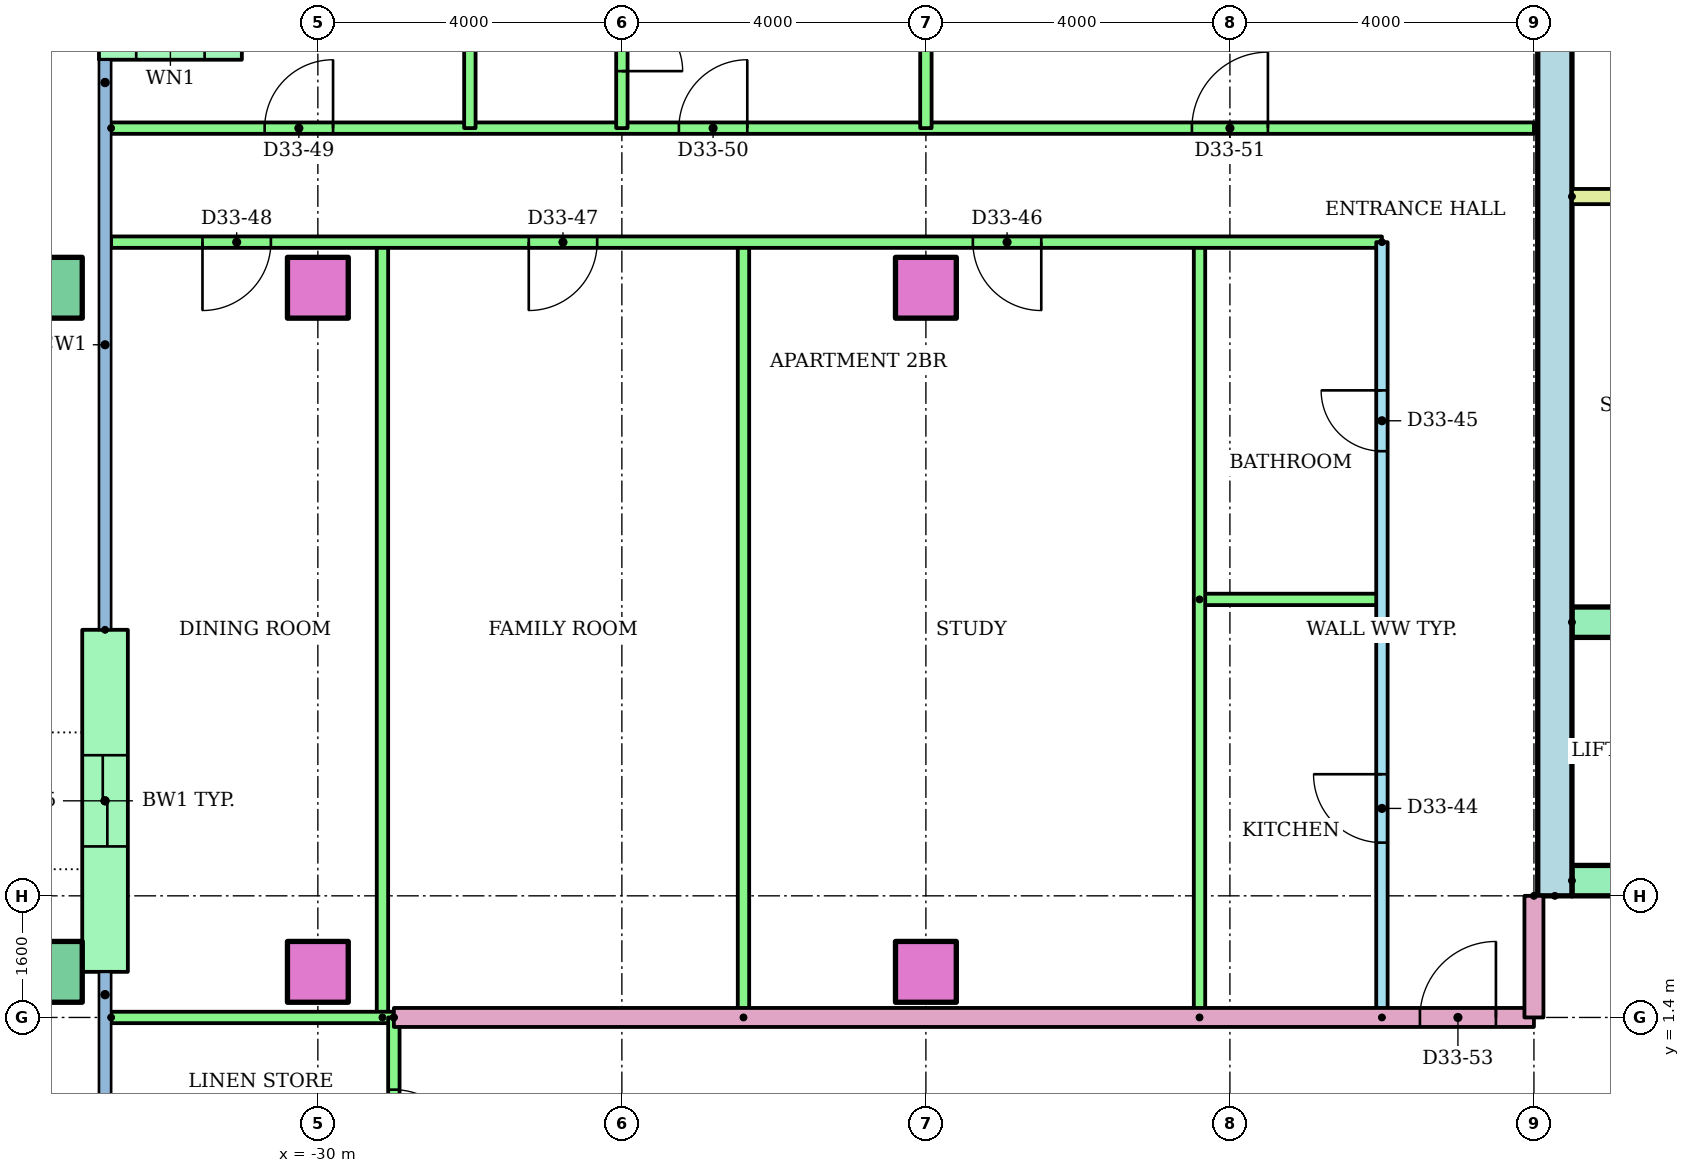
"""IFC4 building model, lengths in metres.
Left out: names, types, materials, properties, quantities, classifications, styles, units other than length and angle.
Written with IfcOpenShell. Run it as: python <this file> out.ifc"""

import sys

from ifc_helpers import new_model, si_unit, direction, frame, frame_2d, origin, origin_2d, place, context, subcontext, project, spatial, rectangle, hollow_rectangle, extrude, element, fill, save


model = new_model("IFC4")
c1 = context("Model", 3, precision=1e-05, world=origin(), true_north=direction((0.0, 1.0)))
c2 = subcontext(c1, "Body", "Model", "MODEL_VIEW")
j1 = project(units=[si_unit("LENGTHUNIT", "METRE"), si_unit("PLANEANGLEUNIT", "RADIAN")], contexts=[c1])
p1 = place(None, origin())
s1 = spatial("IfcSite", under=j1, at=p1, CompositionType="ELEMENT")
p2 = place(p1, origin())
s2 = spatial("IfcBuilding", under=s1, at=p2, CompositionType="ELEMENT")
p3 = place(p2, frame((0.0, 0.0, 129.4)))
s3 = spatial("IfcBuildingStorey", under=s2, at=p3, CompositionType="ELEMENT", Elevation=129.4)
p4 = place(p3, frame((-33.5, 2.0, 0.0)))
e1 = element("IfcColumn", 1, at=p4, inside=s3, PredefinedType="COLUMN", context=c2, shape_type="SweptSolid", body=[
    extrude(hollow_rectangle(XDim=0.8, YDim=0.8, WallThickness=0.04, at=origin_2d()), origin(), (0.0, 0.0, 1.0), 3.2),
])
for number, where in (
    (2, (-30.0, 2.0, 0.0)),
    (3, (-22.0, 2.0, 0.0)),
):
    element("IfcColumn", number, at=place(p3, frame(where)), inside=s3, PredefinedType="COLUMN", context=c2, shape_type="SweptSolid", body=[
        extrude(rectangle(XDim=0.8, YDim=0.8, at=origin_2d()), origin(), (0.0, 0.0, 1.0), 3.2),
    ])
p5 = place(p3, frame((-33.5, 11.0, 0.0)))
e4 = element("IfcColumn", 4, at=p5, inside=s3, PredefinedType="COLUMN", context=c2, shape_type="SweptSolid", body=[
    extrude(hollow_rectangle(XDim=0.8, YDim=0.8, WallThickness=0.04, at=origin_2d()), origin(), (0.0, 0.0, 1.0), 3.2),
])
for number, where in (
    (5, (-30.0, 11.0, 0.0)),
    (6, (-22.0, 11.0, 0.0)),
):
    element("IfcColumn", number, at=place(p3, frame(where)), inside=s3, PredefinedType="COLUMN", context=c2, shape_type="SweptSolid", body=[
        extrude(rectangle(XDim=0.8, YDim=0.8, at=origin_2d()), origin(), (0.0, 0.0, 1.0), 3.2),
    ])
p6 = place(p3, frame((-31.0, 14.3, 0.0), z_axis=(0.0, 0.0, 1.0), x_axis=(-1.0, 0.0, 0.0)))
e7 = element("IfcWall", 7, at=p6, inside=s3, PredefinedType="STANDARD", context=c2, shape_type="SweptSolid", body=[
    extrude(rectangle(XDim=1.88, YDim=0.6, at=frame_2d((0.94, 0.0))), origin(), (0.0, 0.0, 1.0), 2.92),
])
p7 = place(p6, frame((0.49, 0.0, 0.9)))
e8 = element("IfcOpeningElement", 8, at=p7, cuts=e7, PredefinedType="OPENING", context=c2, shape_type="SweptSolid", body=[
    extrude(rectangle(XDim=0.9, YDim=1.5, at=frame_2d((0.45, 0.75))), frame((0.0, 0.31, 0.0), z_axis=(0.0, -1.0, 0.0), x_axis=(1.0, 0.0, 0.0)), (0.0, 0.0, 1.0), 0.62),
])
p8 = place(p3, frame((-32.8, 6.5, 0.0), z_axis=(0.0, 0.0, 1.0), x_axis=(0.0, -1.0, 0.0)))
e9 = element("IfcWall", 9, at=p8, inside=s3, PredefinedType="STANDARD", context=c2, shape_type="SweptSolid", body=[
    extrude(rectangle(XDim=4.5, YDim=0.6, at=frame_2d((2.25, 0.0))), origin(), (0.0, 0.0, 1.0), 2.92),
])
p9 = place(p8, frame((1.65, 0.0, 0.0)))
e10 = element("IfcOpeningElement", 10, at=p9, cuts=e9, PredefinedType="OPENING", context=c2, shape_type="SweptSolid", body=[
    extrude(rectangle(XDim=1.2, YDim=2.1, at=frame_2d((0.6, 1.05))), frame((0.0, 0.31, 0.0), z_axis=(0.0, -1.0, 0.0), x_axis=(1.0, 0.0, 0.0)), (0.0, 0.0, 1.0), 0.62),
])
p10 = place(p3, frame((-13.725, 3.0, 0.0), z_axis=(0.0, 0.0, 1.0), x_axis=(0.0, 1.0, 0.0)))
e11 = element("IfcWall", 11, at=p10, inside=s3, PredefinedType="SHEAR", context=c2, shape_type="SweptSolid", body=[
    extrude(rectangle(XDim=17.0, YDim=0.45, at=frame_2d((8.5, 0.0))), origin(), (0.0, 0.0, 1.0), 2.92),
])
p11 = place(p3, frame((-13.5, 3.2, 0.0)))
e12 = element("IfcWall", 12, at=p11, inside=s3, PredefinedType="SHEAR", context=c2, shape_type="SweptSolid", body=[
    extrude(rectangle(XDim=27.0, YDim=0.4, at=frame_2d((13.5, 0.0))), origin(), (0.0, 0.0, 1.0), 2.92),
])
p12 = place(p11, frame((6.861, 0.0, 0.0)))
e13 = element("IfcOpeningElement", 13, at=p12, cuts=e12, PredefinedType="OPENING", context=c2, shape_type="SweptSolid", body=[
    extrude(rectangle(XDim=1.1, YDim=2.1, at=frame_2d((0.55, 1.05))), frame((0.0, 0.21, 0.0), z_axis=(0.0, -1.0, 0.0), x_axis=(1.0, 0.0, 0.0)), (0.0, 0.0, 1.0), 0.42),
])
p13 = place(p11, frame((9.906, 0.0, 0.0)))
e14 = element("IfcOpeningElement", 14, at=p13, cuts=e12, PredefinedType="OPENING", context=c2, shape_type="SweptSolid", body=[
    extrude(rectangle(XDim=1.1, YDim=2.1, at=frame_2d((0.55, 1.05))), frame((0.0, 0.21, 0.0), z_axis=(0.0, -1.0, 0.0), x_axis=(1.0, 0.0, 0.0)), (0.0, 0.0, 1.0), 0.42),
])
p14 = place(p11, frame((15.994, 0.0, 0.0)))
e15 = element("IfcOpeningElement", 15, at=p14, cuts=e12, PredefinedType="OPENING", context=c2, shape_type="SweptSolid", body=[
    extrude(rectangle(XDim=1.1, YDim=2.1, at=frame_2d((0.55, 1.05))), frame((0.0, 0.21, 0.0), z_axis=(0.0, -1.0, 0.0), x_axis=(1.0, 0.0, 0.0)), (0.0, 0.0, 1.0), 0.42),
])
p15 = place(p11, frame((19.039, 0.0, 0.0)))
e16 = element("IfcOpeningElement", 16, at=p15, cuts=e12, PredefinedType="OPENING", context=c2, shape_type="SweptSolid", body=[
    extrude(rectangle(XDim=1.1, YDim=2.1, at=frame_2d((0.55, 1.05))), frame((0.0, 0.21, 0.0), z_axis=(0.0, -1.0, 0.0), x_axis=(1.0, 0.0, 0.0)), (0.0, 0.0, 1.0), 0.42),
])
p16 = place(p11, frame((12.6, 0.0, 0.0)))
e17 = element("IfcOpeningElement", 17, at=p16, cuts=e12, PredefinedType="OPENING", context=c2, shape_type="SweptSolid", body=[
    extrude(rectangle(XDim=1.8, YDim=2.1, at=frame_2d((0.9, 1.05))), frame((0.0, 0.21, 0.0), z_axis=(0.0, -1.0, 0.0), x_axis=(1.0, 0.0, 0.0)), (0.0, 0.0, 1.0), 0.42),
])
p17 = place(p3, frame((-13.5, 6.6, 0.0)))
e18 = element("IfcWall", 18, at=p17, inside=s3, PredefinedType="SHEAR", context=c2, shape_type="SweptSolid", body=[
    extrude(rectangle(XDim=11.978, YDim=0.4, at=frame_2d((5.989, 0.0))), origin(), (0.0, 0.0, 1.0), 2.92),
])
p18 = place(p3, frame((-13.5, 12.2, 0.0)))
e19 = element("IfcWall", 19, at=p18, inside=s3, PredefinedType="PARTITIONING", context=c2, shape_type="SweptSolid", body=[
    extrude(rectangle(XDim=3.9, YDim=0.2, at=frame_2d((1.95, 0.0))), origin(), (0.0, 0.0, 1.0), 2.92),
])
p19 = place(p3, frame((-16.0, 1.4, 0.0), z_axis=(0.0, 0.0, 1.0), x_axis=(0.0, 1.0, 0.0)))
e20 = element("IfcWall", 20, at=p19, inside=s3, PredefinedType="PARTITIONING", context=c2, shape_type="SweptSolid", body=[
    extrude(rectangle(XDim=10.2, YDim=0.15, at=frame_2d((5.1, 0.0))), origin(), (0.0, 0.0, 1.0), 2.4),
])
p20 = place(p19, frame((2.3, 0.0, 0.0)))
e21 = element("IfcOpeningElement", 21, at=p20, cuts=e20, PredefinedType="OPENING", context=c2, shape_type="SweptSolid", body=[
    extrude(rectangle(XDim=0.9, YDim=2.1, at=frame_2d((0.45, 1.05))), frame((0.0, 0.085, 0.0), z_axis=(0.0, -1.0, 0.0), x_axis=(1.0, 0.0, 0.0)), (0.0, 0.0, 1.0), 0.17),
])
p21 = place(p19, frame((7.45, 0.0, 0.0)))
e22 = element("IfcOpeningElement", 22, at=p21, cuts=e20, PredefinedType="OPENING", context=c2, shape_type="SweptSolid", body=[
    extrude(rectangle(XDim=0.8, YDim=2.1, at=frame_2d((0.4, 1.05))), frame((0.0, 0.085, 0.0), z_axis=(0.0, -1.0, 0.0), x_axis=(1.0, 0.0, 0.0)), (0.0, 0.0, 1.0), 0.17),
])
p22 = place(p3, frame((-18.4, 6.9, 0.0)))
e23 = element("IfcWall", 23, at=p22, inside=s3, PredefinedType="PARTITIONING", context=c2, shape_type="SweptSolid", body=[
    extrude(rectangle(XDim=2.4, YDim=0.15, at=frame_2d((1.2, 0.0))), origin(), (0.0, 0.0, 1.0), 2.4),
])
for number, where, z_axis, x_axis in (
    (24, (-18.4, 1.4, 0.0), (0.0, 0.0, 1.0), (0.0, 1.0, 0.0)),
    (25, (-24.4, 1.4, 0.0), (0.0, 0.0, 1.0), (0.0, 1.0, 0.0)),
    (26, (-29.15, 1.4, 0.0), (0.0, 0.0, 1.0), (0.0, 1.0, 0.0)),
):
    element("IfcWall", number, at=place(p3, frame(where, z_axis=z_axis, x_axis=x_axis)), inside=s3, PredefinedType="PARTITIONING", context=c2, shape_type="SweptSolid", body=[
        extrude(rectangle(XDim=10.2, YDim=0.15, at=frame_2d((5.1, 0.0))), origin(), (0.0, 0.0, 1.0), 2.4),
    ])
p23 = place(p3, frame((-16.0, 11.6, 0.0), z_axis=(0.0, 0.0, 1.0), x_axis=(-1.0, 0.0, 0.0)))
e27 = element("IfcWall", 27, at=p23, inside=s3, PredefinedType="PARTITIONING", context=c2, shape_type="SweptSolid", body=[
    extrude(rectangle(XDim=16.72, YDim=0.15, at=frame_2d((8.36, 0.0))), origin(), (0.0, 0.0, 1.0), 2.4),
])
p24 = place(p23, frame((4.482, 0.0, 0.0)))
e28 = element("IfcOpeningElement", 28, at=p24, cuts=e27, PredefinedType="OPENING", context=c2, shape_type="SweptSolid", body=[
    extrude(rectangle(XDim=0.9, YDim=2.1, at=frame_2d((0.45, 1.05))), frame((0.0, 0.085, 0.0), z_axis=(0.0, -1.0, 0.0), x_axis=(1.0, 0.0, 0.0)), (0.0, 0.0, 1.0), 0.17),
])
p25 = place(p23, frame((10.325, 0.0, 0.0)))
e29 = element("IfcOpeningElement", 29, at=p25, cuts=e27, PredefinedType="OPENING", context=c2, shape_type="SweptSolid", body=[
    extrude(rectangle(XDim=0.9, YDim=2.1, at=frame_2d((0.45, 1.05))), frame((0.0, 0.085, 0.0), z_axis=(0.0, -1.0, 0.0), x_axis=(1.0, 0.0, 0.0)), (0.0, 0.0, 1.0), 0.17),
])
p26 = place(p23, frame((14.618, 0.0, 0.0)))
e30 = element("IfcOpeningElement", 30, at=p26, cuts=e27, PredefinedType="OPENING", context=c2, shape_type="SweptSolid", body=[
    extrude(rectangle(XDim=0.9, YDim=2.1, at=frame_2d((0.45, 1.05))), frame((0.0, 0.085, 0.0), z_axis=(0.0, -1.0, 0.0), x_axis=(1.0, 0.0, 0.0)), (0.0, 0.0, 1.0), 0.17),
])
p27 = place(p3, frame((-32.72, 13.1, 0.0)))
e31 = element("IfcWall", 31, at=p27, inside=s3, PredefinedType="PARTITIONING", context=c2, shape_type="SweptSolid", body=[
    extrude(rectangle(XDim=18.72, YDim=0.15, at=frame_2d((9.36, 0.0))), origin(), (0.0, 0.0, 1.0), 2.4),
])
p28 = place(p27, frame((2.02, 0.0, 0.0)))
e32 = element("IfcOpeningElement", 32, at=p28, cuts=e31, PredefinedType="OPENING", context=c2, shape_type="SweptSolid", body=[
    extrude(rectangle(XDim=0.9, YDim=2.1, at=frame_2d((0.45, 1.05))), frame((0.0, 0.085, 0.0), z_axis=(0.0, -1.0, 0.0), x_axis=(1.0, 0.0, 0.0)), (0.0, 0.0, 1.0), 0.17),
])
p29 = place(p27, frame((7.47, 0.0, 0.0)))
e33 = element("IfcOpeningElement", 33, at=p29, cuts=e31, PredefinedType="OPENING", context=c2, shape_type="SweptSolid", body=[
    extrude(rectangle(XDim=0.9, YDim=2.1, at=frame_2d((0.45, 1.05))), frame((0.0, 0.085, 0.0), z_axis=(0.0, -1.0, 0.0), x_axis=(1.0, 0.0, 0.0)), (0.0, 0.0, 1.0), 0.17),
])
p30 = place(p27, frame((14.22, 0.0, 0.0)))
e34 = element("IfcOpeningElement", 34, at=p30, cuts=e31, PredefinedType="OPENING", context=c2, shape_type="SweptSolid", body=[
    extrude(rectangle(XDim=1.0, YDim=2.1, at=frame_2d((0.5, 1.05))), frame((0.0, 0.085, 0.0), z_axis=(0.0, -1.0, 0.0), x_axis=(1.0, 0.0, 0.0)), (0.0, 0.0, 1.0), 0.17),
])
p31 = place(p3, frame((-28.0, 16.92, 0.0), z_axis=(0.0, 0.0, 1.0), x_axis=(0.0, -1.0, 0.0)))
e35 = element("IfcWall", 35, at=p31, inside=s3, PredefinedType="PARTITIONING", context=c2, shape_type="SweptSolid", body=[
    extrude(rectangle(XDim=3.82, YDim=0.15, at=frame_2d((1.91, 0.0))), origin(), (0.0, 0.0, 1.0), 2.4),
])
p32 = place(p3, frame((-22.0, 18.721, 0.0), z_axis=(0.0, 0.0, 1.0), x_axis=(0.0, -1.0, 0.0)))
e36 = element("IfcWall", 36, at=p32, inside=s3, PredefinedType="PARTITIONING", context=c2, shape_type="SweptSolid", body=[
    extrude(rectangle(XDim=5.621, YDim=0.15, at=frame_2d((2.811, 0.0))), origin(), (0.0, 0.0, 1.0), 2.4),
])
p33 = place(p3, frame((-26.0, 15.4, 0.0), z_axis=(0.0, 0.0, 1.0), x_axis=(0.0, -1.0, 0.0)))
e37 = element("IfcWall", 37, at=p33, inside=s3, PredefinedType="PARTITIONING", context=c2, shape_type="SweptSolid", body=[
    extrude(rectangle(XDim=2.3, YDim=0.15, at=frame_2d((1.15, 0.0))), origin(), (0.0, 0.0, 1.0), 2.4),
])
p34 = place(p33, frame((0.75, 0.0, 0.0)))
e38 = element("IfcOpeningElement", 38, at=p34, cuts=e37, PredefinedType="OPENING", context=c2, shape_type="SweptSolid", body=[
    extrude(rectangle(XDim=0.8, YDim=2.1, at=frame_2d((0.4, 1.05))), frame((0.0, 0.085, 0.0), z_axis=(0.0, -1.0, 0.0), x_axis=(1.0, 0.0, 0.0)), (0.0, 0.0, 1.0), 0.17),
])
p35 = place(p3, frame((-29.0, 1.4, 0.0)))
e39 = element("IfcWall", 39, at=p35, inside=s3, PredefinedType="PARTITIONING", context=c2, shape_type="SweptSolid", body=[
    extrude(rectangle(XDim=15.0, YDim=0.25, at=frame_2d((7.5, 0.0))), origin(), (0.0, 0.0, 1.0), 2.4),
])
p36 = place(p35, frame((13.5, 0.0, 0.0)))
e40 = element("IfcOpeningElement", 40, at=p36, cuts=e39, PredefinedType="OPENING", context=c2, shape_type="SweptSolid", body=[
    extrude(rectangle(XDim=1.0, YDim=2.1, at=frame_2d((0.5, 1.05))), frame((0.0, 0.135, 0.0), z_axis=(0.0, -1.0, 0.0), x_axis=(1.0, 0.0, 0.0)), (0.0, 0.0, 1.0), 0.27),
])
p37 = place(p3, frame((-32.72, 1.4, 0.0)))
e41 = element("IfcWall", 41, at=p37, inside=s3, PredefinedType="PARTITIONING", context=c2, shape_type="SweptSolid", body=[
    extrude(rectangle(XDim=3.72, YDim=0.15, at=frame_2d((1.86, 0.0))), origin(), (0.0, 0.0, 1.0), 2.4),
])
p38 = place(p3, frame((-29.0, 1.4, 0.0), z_axis=(0.0, 0.0, 1.0), x_axis=(0.0, -1.0, 0.0)))
e42 = element("IfcWall", 42, at=p38, inside=s3, PredefinedType="PARTITIONING", context=c2, shape_type="SweptSolid", body=[
    extrude(rectangle(XDim=2.8, YDim=0.15, at=frame_2d((1.4, 0.0))), origin(), (0.0, 0.0, 1.0), 2.4),
])
p39 = place(p38, frame((0.95, 0.0, 0.0)))
e43 = element("IfcOpeningElement", 43, at=p39, cuts=e42, PredefinedType="OPENING", context=c2, shape_type="SweptSolid", body=[
    extrude(rectangle(XDim=0.9, YDim=2.1, at=frame_2d((0.45, 1.05))), frame((0.0, 0.085, 0.0), z_axis=(0.0, -1.0, 0.0), x_axis=(1.0, 0.0, 0.0)), (0.0, 0.0, 1.0), 0.17),
])
p40 = place(p3, frame((-14.0, 3.0, 0.0), z_axis=(0.0, 0.0, 1.0), x_axis=(0.0, -1.0, 0.0)))
e44 = element("IfcWall", 44, at=p40, inside=s3, PredefinedType="PARTITIONING", context=c2, shape_type="SweptSolid", body=[
    extrude(rectangle(XDim=1.6, YDim=0.25, at=frame_2d((0.8, 0.0))), origin(), (0.0, 0.0, 1.0), 2.4),
])
p41 = place(p20, origin())
e45 = element("IfcDoor", 45, at=p41, inside=s3, OperationType="SINGLE_SWING_RIGHT", PredefinedType="DOOR", context=c2, shape_type="SweptSolid", body=[
    extrude(rectangle(XDim=0.9, YDim=2.1, at=frame_2d((0.45, 1.05))), frame((0.0, 0.025, 0.0), z_axis=(0.0, -1.0, 0.0), x_axis=(1.0, 0.0, 0.0)), (0.0, 0.0, 1.0), 0.05),
])
fill(e21, e45)
p42 = place(p21, origin())
e46 = element("IfcDoor", 46, at=p42, inside=s3, OperationType="SINGLE_SWING_RIGHT", PredefinedType="DOOR", context=c2, shape_type="SweptSolid", body=[
    extrude(rectangle(XDim=0.8, YDim=2.1, at=frame_2d((0.4, 1.05))), frame((0.0, 0.025, 0.0), z_axis=(0.0, -1.0, 0.0), x_axis=(1.0, 0.0, 0.0)), (0.0, 0.0, 1.0), 0.05),
])
fill(e22, e46)
p43 = place(p24, origin())
e47 = element("IfcDoor", 47, at=p43, inside=s3, OperationType="SINGLE_SWING_LEFT", PredefinedType="DOOR", context=c2, shape_type="SweptSolid", body=[
    extrude(rectangle(XDim=0.9, YDim=2.1, at=frame_2d((0.45, 1.05))), frame((0.0, 0.025, 0.0), z_axis=(0.0, -1.0, 0.0), x_axis=(1.0, 0.0, 0.0)), (0.0, 0.0, 1.0), 0.05),
])
fill(e28, e47)
p44 = place(p25, origin())
e48 = element("IfcDoor", 48, at=p44, inside=s3, OperationType="SINGLE_SWING_RIGHT", PredefinedType="DOOR", context=c2, shape_type="SweptSolid", body=[
    extrude(rectangle(XDim=0.9, YDim=2.1, at=frame_2d((0.45, 1.05))), frame((0.0, 0.025, 0.0), z_axis=(0.0, -1.0, 0.0), x_axis=(1.0, 0.0, 0.0)), (0.0, 0.0, 1.0), 0.05),
])
fill(e29, e48)
p45 = place(p26, origin())
e49 = element("IfcDoor", 49, at=p45, inside=s3, OperationType="SINGLE_SWING_RIGHT", PredefinedType="DOOR", context=c2, shape_type="SweptSolid", body=[
    extrude(rectangle(XDim=0.9, YDim=2.1, at=frame_2d((0.45, 1.05))), frame((0.0, 0.025, 0.0), z_axis=(0.0, -1.0, 0.0), x_axis=(1.0, 0.0, 0.0)), (0.0, 0.0, 1.0), 0.05),
])
fill(e30, e49)
p46 = place(p28, origin())
e50 = element("IfcDoor", 50, at=p46, inside=s3, OperationType="SINGLE_SWING_RIGHT", PredefinedType="DOOR", context=c2, shape_type="SweptSolid", body=[
    extrude(rectangle(XDim=0.9, YDim=2.1, at=frame_2d((0.45, 1.05))), frame((0.0, 0.025, 0.0), z_axis=(0.0, -1.0, 0.0), x_axis=(1.0, 0.0, 0.0)), (0.0, 0.0, 1.0), 0.05),
])
fill(e32, e50)
p47 = place(p29, origin())
e51 = element("IfcDoor", 51, at=p47, inside=s3, OperationType="SINGLE_SWING_RIGHT", PredefinedType="DOOR", context=c2, shape_type="SweptSolid", body=[
    extrude(rectangle(XDim=0.9, YDim=2.1, at=frame_2d((0.45, 1.05))), frame((0.0, 0.025, 0.0), z_axis=(0.0, -1.0, 0.0), x_axis=(1.0, 0.0, 0.0)), (0.0, 0.0, 1.0), 0.05),
])
fill(e33, e51)
p48 = place(p30, origin())
e52 = element("IfcDoor", 52, at=p48, inside=s3, OperationType="SINGLE_SWING_RIGHT", PredefinedType="DOOR", context=c2, shape_type="SweptSolid", body=[
    extrude(rectangle(XDim=1.0, YDim=2.1, at=frame_2d((0.5, 1.05))), frame((0.0, 0.025, 0.0), z_axis=(0.0, -1.0, 0.0), x_axis=(1.0, 0.0, 0.0)), (0.0, 0.0, 1.0), 0.05),
])
fill(e34, e52)
p49 = place(p34, origin())
e53 = element("IfcDoor", 53, at=p49, inside=s3, OperationType="SINGLE_SWING_RIGHT", PredefinedType="DOOR", context=c2, shape_type="SweptSolid", body=[
    extrude(rectangle(XDim=0.8, YDim=2.1, at=frame_2d((0.4, 1.05))), frame((0.0, 0.025, 0.0), z_axis=(0.0, -1.0, 0.0), x_axis=(1.0, 0.0, 0.0)), (0.0, 0.0, 1.0), 0.05),
])
fill(e38, e53)
p50 = place(p36, origin())
e54 = element("IfcDoor", 54, at=p50, inside=s3, OperationType="SINGLE_SWING_RIGHT", PredefinedType="DOOR", context=c2, shape_type="SweptSolid", body=[
    extrude(rectangle(XDim=1.0, YDim=2.1, at=frame_2d((0.5, 1.05))), frame((0.0, 0.025, 0.0), z_axis=(0.0, -1.0, 0.0), x_axis=(1.0, 0.0, 0.0)), (0.0, 0.0, 1.0), 0.05),
])
fill(e40, e54)
p51 = place(p39, origin())
e55 = element("IfcDoor", 55, at=p51, inside=s3, OperationType="SINGLE_SWING_RIGHT", PredefinedType="DOOR", context=c2, shape_type="SweptSolid", body=[
    extrude(rectangle(XDim=0.9, YDim=2.1, at=frame_2d((0.45, 1.05))), frame((0.0, 0.025, 0.0), z_axis=(0.0, -1.0, 0.0), x_axis=(1.0, 0.0, 0.0)), (0.0, 0.0, 1.0), 0.05),
])
fill(e43, e55)
p52 = place(p9, origin())
e56 = element("IfcDoor", 56, at=p52, inside=s3, OperationType="SLIDING_TO_LEFT", PredefinedType="DOOR", context=c2, shape_type="SweptSolid", body=[
    extrude(rectangle(XDim=1.2, YDim=2.1, at=frame_2d((0.6, 1.05))), frame((0.0, 0.025, 0.0), z_axis=(0.0, -1.0, 0.0), x_axis=(1.0, 0.0, 0.0)), (0.0, 0.0, 1.0), 0.05),
])
fill(e10, e56)
save(model, sys.argv[1])
